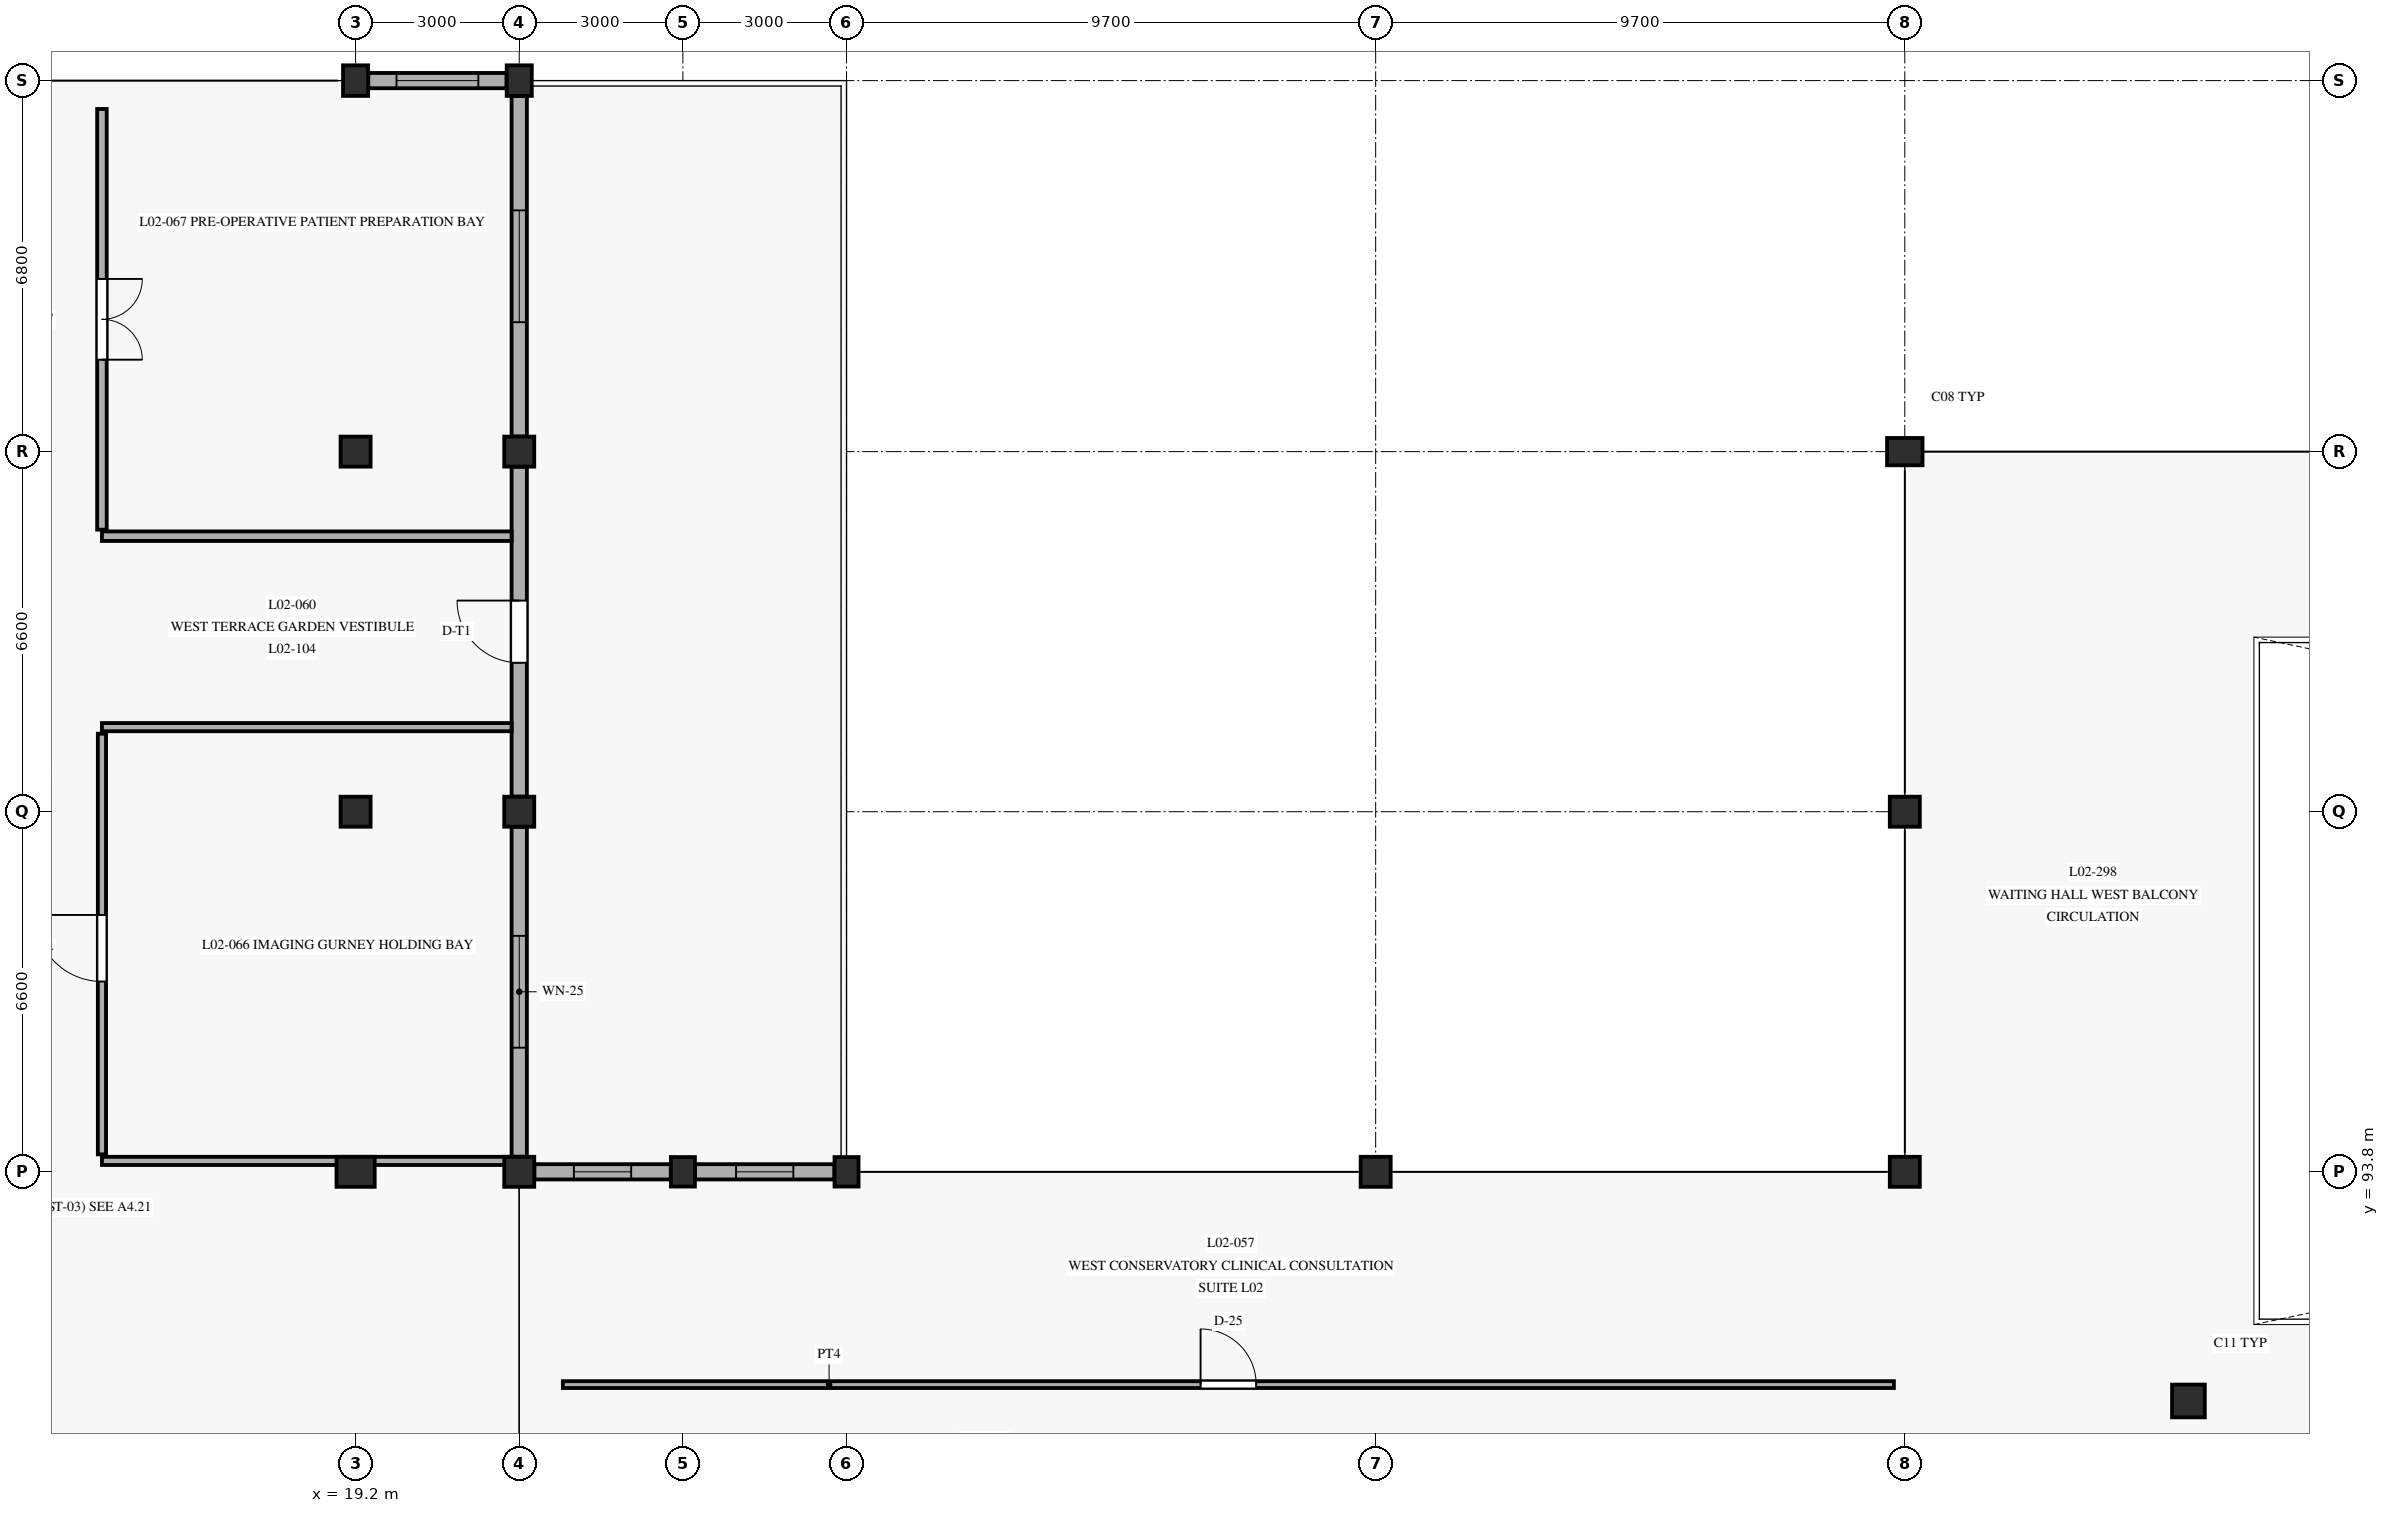
"""IFC4 building model, lengths in metres.
Left out: names, types, materials, properties, quantities, classifications, styles, units other than length and angle.
Written with IfcOpenShell. Run it as: python <this file> out.ifc"""

import sys

from ifc_helpers import new_model, si_unit, direction, frame, frame_2d, origin, origin_with_axes, origin_2d, place, context, subcontext, project, spatial, rectangle, circle, extrude, element, fill, save


model = new_model("IFC4")
c1 = context("Model", 3, precision=1e-05, world=origin(), true_north=direction((0.0, 1.0)))
c2 = subcontext(c1, "Body", "Model", "MODEL_VIEW")
j1 = project(units=[si_unit("LENGTHUNIT", "METRE"), si_unit("PLANEANGLEUNIT", "RADIAN")], contexts=[c1])
p1 = place(None, origin())
s1 = spatial("IfcSite", under=j1, at=p1, CompositionType="ELEMENT")
p2 = place(p1, origin())
s2 = spatial("IfcBuilding", under=s1, at=p2, CompositionType="ELEMENT")
p3 = place(p2, frame((0.0, 0.0, 4.8)))
s3 = spatial("IfcBuildingStorey", under=s2, at=p3, CompositionType="ELEMENT", Elevation=4.8)
p4 = place(p3, frame((19.2, 93.8, 0.0), z_axis=(0.0, 0.0, 1.0), x_axis=(1.0, 0.0, 0.0)))
e1 = element("IfcColumn", 1, at=p4, inside=s3, PredefinedType="COLUMN", context=c2, shape_type="SweptSolid", body=[
    extrude(rectangle(XDim=0.7, YDim=0.55, at=origin_2d()), origin(), (0.0, 0.0, 1.0), 4.5),
])
for number, where, z_axis, x_axis in (
    (2, (19.2, 100.4, 0.0), (0.0, 0.0, 1.0), (1.0, 0.0, 0.0)),
    (3, (19.2, 107.0, 0.0), (0.0, 0.0, 1.0), (1.0, 0.0, 0.0)),
):
    element("IfcColumn", number, at=place(p3, frame(where, z_axis=z_axis, x_axis=x_axis)), inside=s3, PredefinedType="COLUMN", context=c2, shape_type="SweptSolid", body=[
        extrude(rectangle(XDim=0.55, YDim=0.55, at=origin_2d()), origin(), (0.0, 0.0, 1.0), 4.5),
    ])
p5 = place(p3, frame((19.2, 113.8, 0.0), z_axis=(0.0, 0.0, 1.0), x_axis=(1.0, 0.0, 0.0)))
e4 = element("IfcColumn", 4, at=p5, inside=s3, PredefinedType="COLUMN", context=c2, shape_type="SweptSolid", body=[
    extrude(rectangle(XDim=0.46, YDim=0.56, at=origin_2d()), origin(), (0.0, 0.0, 1.0), 4.5),
])
for number, where, z_axis, x_axis in (
    (5, (22.2, 93.8, 0.0), (0.0, 0.0, 1.0), (1.0, 0.0, 0.0)),
    (6, (22.2, 100.4, 0.0), (0.0, 0.0, 1.0), (1.0, 0.0, 0.0)),
    (7, (22.2, 107.0, 0.0), (0.0, 0.0, 1.0), (1.0, 0.0, 0.0)),
):
    element("IfcColumn", number, at=place(p3, frame(where, z_axis=z_axis, x_axis=x_axis)), inside=s3, PredefinedType="COLUMN", context=c2, shape_type="SweptSolid", body=[
        extrude(rectangle(XDim=0.55, YDim=0.55, at=origin_2d()), origin(), (0.0, 0.0, 1.0), 4.5),
    ])
p6 = place(p3, frame((22.2, 113.8, 0.0), z_axis=(0.0, 0.0, 1.0), x_axis=(1.0, 0.0, 0.0)))
e8 = element("IfcColumn", 8, at=p6, inside=s3, PredefinedType="COLUMN", context=c2, shape_type="SweptSolid", body=[
    extrude(rectangle(XDim=0.46, YDim=0.56, at=origin_2d()), origin(), (0.0, 0.0, 1.0), 4.5),
])
for number, where, z_axis, x_axis in (
    (9, (25.2, 93.8, 0.0), (0.0, 0.0, 1.0), (1.0, 0.0, 0.0)),
    (10, (28.2, 93.8, 0.0), (0.0, 0.0, 1.0), (1.0, 0.0, 0.0)),
):
    element("IfcColumn", number, at=place(p3, frame(where, z_axis=z_axis, x_axis=x_axis)), inside=s3, PredefinedType="PILASTER", context=c2, shape_type="SweptSolid", body=[
        extrude(rectangle(XDim=0.44, YDim=0.54, at=origin_2d()), origin(), (0.0, 0.0, 1.0), 4.5),
    ])
for number, where, z_axis, x_axis in (
    (11, (37.9, 93.8, 0.0), (0.0, 0.0, 1.0), (1.0, 0.0, 0.0)),
    (12, (47.6, 93.8, 0.0), (0.0, 0.0, 1.0), (1.0, 0.0, 0.0)),
    (13, (47.6, 100.4, 0.0), (0.0, 0.0, 1.0), (1.0, 0.0, 0.0)),
):
    element("IfcColumn", number, at=place(p3, frame(where, z_axis=z_axis, x_axis=x_axis)), inside=s3, PredefinedType="COLUMN", context=c2, shape_type="SweptSolid", body=[
        extrude(rectangle(XDim=0.55, YDim=0.55, at=origin_2d()), origin(), (0.0, 0.0, 1.0), 4.5),
    ])
p7 = place(p3, frame((47.6, 107.0, 0.0), z_axis=(0.0, 0.0, 1.0), x_axis=(1.0, 0.0, 0.0)))
e14 = element("IfcColumn", 14, at=p7, inside=s3, PredefinedType="COLUMN", context=c2, shape_type="SweptSolid", body=[
    extrude(rectangle(XDim=0.65, YDim=0.5, at=origin_2d()), origin(), (0.0, 0.0, 1.0), 4.5),
])
p8 = place(p3, frame((52.8, 89.6, 0.0), z_axis=(0.0, 0.0, 1.0), x_axis=(1.0, 0.0, 0.0)))
e15 = element("IfcColumn", 15, at=p8, inside=s3, PredefinedType="COLUMN", context=c2, shape_type="SweptSolid", body=[
    extrude(circle(Radius=0.3, at=origin_2d()), origin(), (0.0, 0.0, 1.0), 4.5),
])
p9 = place(p3, frame((22.2, 94.077, 0.0), z_axis=(0.0, 0.0, 1.0), x_axis=(0.0, 1.0, 0.0)))
e16 = element("IfcWall", 16, at=p9, inside=s3, PredefinedType="SOLIDWALL", context=c2, shape_type="SweptSolid", body=[
    extrude(rectangle(XDim=6.046, YDim=0.28, at=frame_2d((3.023, 0.0))), origin(), (0.0, 0.0, 1.0), 3.74),
])
p10 = place(p9, frame((1.998, 0.0, 0.8)))
e17 = element("IfcOpeningElement", 17, at=p10, cuts=e16, PredefinedType="OPENING", context=c2, shape_type="SweptSolid", body=[
    extrude(rectangle(XDim=2.05, YDim=1.95, at=frame_2d((1.025, 0.975))), frame((0.0, 0.15, 0.0), z_axis=(0.0, -1.0, 0.0), x_axis=(1.0, 0.0, 0.0)), (0.0, 0.0, 1.0), 0.3),
])
p11 = place(p3, frame((22.2, 100.677, 0.0), z_axis=(0.0, 0.0, 1.0), x_axis=(0.0, 1.0, 0.0)))
e18 = element("IfcWall", 18, at=p11, inside=s3, PredefinedType="SOLIDWALL", context=c2, shape_type="SweptSolid", body=[
    extrude(rectangle(XDim=6.046, YDim=0.28, at=frame_2d((3.023, 0.0))), origin(), (0.0, 0.0, 1.0), 3.79),
])
p12 = place(p11, frame((2.453, 0.0, 0.0)))
e19 = element("IfcOpeningElement", 19, at=p12, cuts=e18, PredefinedType="OPENING", context=c2, shape_type="SweptSolid", body=[
    extrude(rectangle(XDim=1.14, YDim=2.3, at=frame_2d((0.57, 1.15))), frame((0.0, 0.15, 0.0), z_axis=(0.0, -1.0, 0.0), x_axis=(1.0, 0.0, 0.0)), (0.0, 0.0, 1.0), 0.3),
])
p13 = place(p3, frame((22.2, 107.277, 0.0), z_axis=(0.0, 0.0, 1.0), x_axis=(0.0, 1.0, 0.0)))
e20 = element("IfcWall", 20, at=p13, inside=s3, PredefinedType="SOLIDWALL", context=c2, shape_type="SweptSolid", body=[
    extrude(rectangle(XDim=6.241, YDim=0.28, at=frame_2d((3.121, 0.0))), origin(), (0.0, 0.0, 1.0), 3.79),
])
p14 = place(p13, frame((2.095, 0.0, 0.8)))
e21 = element("IfcOpeningElement", 21, at=p14, cuts=e20, PredefinedType="OPENING", context=c2, shape_type="SweptSolid", body=[
    extrude(rectangle(XDim=2.05, YDim=1.95, at=frame_2d((1.025, 0.975))), frame((0.0, 0.15, 0.0), z_axis=(0.0, -1.0, 0.0), x_axis=(1.0, 0.0, 0.0)), (0.0, 0.0, 1.0), 0.3),
])
p15 = place(p3, frame((21.968, 113.8, 0.0), z_axis=(0.0, 0.0, 1.0), x_axis=(-1.0, 0.0, 0.0)))
e22 = element("IfcWall", 22, at=p15, inside=s3, PredefinedType="SOLIDWALL", context=c2, shape_type="SweptSolid", body=[
    extrude(rectangle(XDim=2.536, YDim=0.28, at=frame_2d((1.268, 0.0))), origin(), (0.0, 0.0, 1.0), 3.75),
])
p16 = place(p15, frame((0.518, 0.0, 0.9)))
e23 = element("IfcOpeningElement", 23, at=p16, cuts=e22, PredefinedType="OPENING", context=c2, shape_type="SweptSolid", body=[
    extrude(rectangle(XDim=1.5, YDim=2.2, at=frame_2d((0.75, 1.1))), frame((0.0, 0.15, 0.0), z_axis=(0.0, -1.0, 0.0), x_axis=(1.0, 0.0, 0.0)), (0.0, 0.0, 1.0), 0.3),
])
p17 = place(p3, frame((24.978, 93.8, 0.0), z_axis=(0.0, 0.0, 1.0), x_axis=(-1.0, 0.0, 0.0)))
e24 = element("IfcWall", 24, at=p17, inside=s3, PredefinedType="SOLIDWALL", context=c2, shape_type="SweptSolid", body=[
    extrude(rectangle(XDim=2.501, YDim=0.28, at=frame_2d((1.25, 0.0))), origin(), (0.0, 0.0, 1.0), 3.84),
])
p18 = place(p17, frame((0.726, 0.0, 0.85)))
e25 = element("IfcOpeningElement", 25, at=p18, cuts=e24, PredefinedType="OPENING", context=c2, shape_type="SweptSolid", body=[
    extrude(rectangle(XDim=1.05, YDim=2.2, at=frame_2d((0.525, 1.1))), frame((0.0, 0.15, 0.0), z_axis=(0.0, -1.0, 0.0), x_axis=(1.0, 0.0, 0.0)), (0.0, 0.0, 1.0), 0.3),
])
p19 = place(p3, frame((27.978, 93.8, 0.0), z_axis=(0.0, 0.0, 1.0), x_axis=(-1.0, 0.0, 0.0)))
e26 = element("IfcWall", 26, at=p19, inside=s3, PredefinedType="SOLIDWALL", context=c2, shape_type="SweptSolid", body=[
    extrude(rectangle(XDim=2.556, YDim=0.28, at=frame_2d((1.278, 0.0))), origin(), (0.0, 0.0, 1.0), 3.89),
])
p20 = place(p19, frame((0.753, 0.0, 0.85)))
e27 = element("IfcOpeningElement", 27, at=p20, cuts=e26, PredefinedType="OPENING", context=c2, shape_type="SweptSolid", body=[
    extrude(rectangle(XDim=1.05, YDim=2.2, at=frame_2d((0.525, 1.1))), frame((0.0, 0.15, 0.0), z_axis=(0.0, -1.0, 0.0), x_axis=(1.0, 0.0, 0.0)), (0.0, 0.0, 1.0), 0.3),
])
p21 = place(p3, frame((23.0, 89.9, 0.0), z_axis=(0.0, 0.0, 1.0), x_axis=(1.0, 0.0, 0.0)))
e28 = element("IfcWall", 28, at=p21, inside=s3, PredefinedType="PARTITIONING", context=c2, shape_type="SweptSolid", body=[
    extrude(rectangle(XDim=24.4, YDim=0.125, at=frame_2d((12.2, 0.0))), origin(), (0.0, 0.0, 1.0), 3.785),
])
p22 = place(p21, frame((11.69, 0.0, 0.0)))
e29 = element("IfcOpeningElement", 29, at=p22, cuts=e28, PredefinedType="OPENING", context=c2, shape_type="SweptSolid", body=[
    extrude(rectangle(XDim=1.02, YDim=2.18, at=frame_2d((0.51, 1.09))), frame((0.0, 0.073, 0.0), z_axis=(0.0, -1.0, 0.0), x_axis=(1.0, 0.0, 0.0)), (0.0, 0.0, 1.0), 0.145),
])
p23 = place(p3, frame((14.55, 94.12, 0.0), z_axis=(0.0, 0.0, 1.0), x_axis=(0.0, 1.0, 0.0)))
e30 = element("IfcWall", 30, at=p23, inside=s3, PredefinedType="PARTITIONING", context=c2, shape_type="SweptSolid", body=[
    extrude(rectangle(XDim=7.71, YDim=0.15, at=frame_2d((3.855, 0.0))), origin(), (0.0, 0.0, 1.0), 3.795),
])
p24 = place(p23, frame((3.168, 0.0, 0.0)))
e31 = element("IfcOpeningElement", 31, at=p24, cuts=e30, PredefinedType="OPENING", context=c2, shape_type="SweptSolid", body=[
    extrude(rectangle(XDim=1.22, YDim=2.2, at=frame_2d((0.61, 1.1))), frame((0.0, 0.085, 0.0), z_axis=(0.0, -1.0, 0.0), x_axis=(1.0, 0.0, 0.0)), (0.0, 0.0, 1.0), 0.17),
])
p25 = place(p3, frame((14.55, 94.0, 0.0), z_axis=(0.0, 0.0, 1.0), x_axis=(1.0, 0.0, 0.0)))
e32 = element("IfcWall", 32, at=p25, inside=s3, PredefinedType="PARTITIONING", context=c2, shape_type="SweptSolid", body=[
    extrude(rectangle(XDim=7.51, YDim=0.15, at=frame_2d((3.755, 0.0))), origin(), (0.0, 0.0, 1.0), 3.735),
])
p26 = place(p3, frame((14.55, 101.95, 0.0), z_axis=(0.0, 0.0, 1.0), x_axis=(1.0, 0.0, 0.0)))
e33 = element("IfcWall", 33, at=p26, inside=s3, PredefinedType="PARTITIONING", context=c2, shape_type="SweptSolid", body=[
    extrude(rectangle(XDim=7.51, YDim=0.15, at=frame_2d((3.755, 0.0))), origin(), (0.0, 0.0, 1.0), 3.785),
])
p27 = place(p3, frame((14.55, 105.57, 0.0), z_axis=(0.0, 0.0, 1.0), x_axis=(0.0, 1.0, 0.0)))
e34 = element("IfcWall", 34, at=p27, inside=s3, PredefinedType="PARTITIONING", context=c2, shape_type="SweptSolid", body=[
    extrude(rectangle(XDim=7.71, YDim=0.175, at=frame_2d((3.855, 0.0))), origin(), (0.0, 0.0, 1.0), 3.795),
])
p28 = place(p27, frame((3.115, 0.0, 0.0)))
e35 = element("IfcOpeningElement", 35, at=p28, cuts=e34, PredefinedType="OPENING", context=c2, shape_type="SweptSolid", body=[
    extrude(rectangle(XDim=1.48, YDim=2.28, at=frame_2d((0.74, 1.14))), frame((0.0, 0.098, 0.0), z_axis=(0.0, -1.0, 0.0), x_axis=(1.0, 0.0, 0.0)), (0.0, 0.0, 1.0), 0.195),
])
p29 = place(p3, frame((14.55, 105.45, 0.0), z_axis=(0.0, 0.0, 1.0), x_axis=(1.0, 0.0, 0.0)))
e36 = element("IfcWall", 36, at=p29, inside=s3, PredefinedType="PARTITIONING", context=c2, shape_type="SweptSolid", body=[
    extrude(rectangle(XDim=7.51, YDim=0.175, at=frame_2d((3.755, 0.0))), origin(), (0.0, 0.0, 1.0), 3.785),
])
p30 = place(p10, origin_with_axes())
e37 = element("IfcWindow", 37, at=p30, inside=s3, PartitioningType="SINGLE_PANEL", PredefinedType="WINDOW", context=c2, shape_type="SweptSolid", body=[
    extrude(rectangle(XDim=2.05, YDim=1.95, at=frame_2d((1.025, 0.975))), frame((0.0, 0.03, 0.0), z_axis=(0.0, -1.0, 0.0), x_axis=(1.0, 0.0, 0.0)), (0.0, 0.0, 1.0), 0.06),
])
fill(e17, e37)
p31 = place(p12, frame((1.14, 0.0, 0.0), z_axis=(0.0, 0.0, 1.0), x_axis=(-1.0, 0.0, 0.0)))
e38 = element("IfcDoor", 38, at=p31, inside=s3, OperationType="SINGLE_SWING_LEFT", PredefinedType="DOOR", context=c2, shape_type="SweptSolid", body=[
    extrude(rectangle(XDim=1.14, YDim=2.3, at=frame_2d((0.57, 1.15))), frame((0.0, 0.025, 0.0), z_axis=(0.0, -1.0, 0.0), x_axis=(1.0, 0.0, 0.0)), (0.0, 0.0, 1.0), 0.05),
])
fill(e19, e38)
p32 = place(p14, origin_with_axes())
e39 = element("IfcWindow", 39, at=p32, inside=s3, PartitioningType="SINGLE_PANEL", PredefinedType="WINDOW", context=c2, shape_type="SweptSolid", body=[
    extrude(rectangle(XDim=2.05, YDim=1.95, at=frame_2d((1.025, 0.975))), frame((0.0, 0.03, 0.0), z_axis=(0.0, -1.0, 0.0), x_axis=(1.0, 0.0, 0.0)), (0.0, 0.0, 1.0), 0.06),
])
fill(e21, e39)
p33 = place(p16, origin_with_axes())
e40 = element("IfcWindow", 40, at=p33, inside=s3, PartitioningType="SINGLE_PANEL", PredefinedType="WINDOW", context=c2, shape_type="SweptSolid", body=[
    extrude(rectangle(XDim=1.5, YDim=2.2, at=frame_2d((0.75, 1.1))), frame((0.0, 0.03, 0.0), z_axis=(0.0, -1.0, 0.0), x_axis=(1.0, 0.0, 0.0)), (0.0, 0.0, 1.0), 0.06),
])
fill(e23, e40)
p34 = place(p18, origin_with_axes())
e41 = element("IfcWindow", 41, at=p34, inside=s3, PartitioningType="SINGLE_PANEL", PredefinedType="WINDOW", context=c2, shape_type="SweptSolid", body=[
    extrude(rectangle(XDim=1.05, YDim=2.2, at=frame_2d((0.525, 1.1))), frame((0.0, 0.03, 0.0), z_axis=(0.0, -1.0, 0.0), x_axis=(1.0, 0.0, 0.0)), (0.0, 0.0, 1.0), 0.06),
])
fill(e25, e41)
p35 = place(p20, origin_with_axes())
e42 = element("IfcWindow", 42, at=p35, inside=s3, PartitioningType="SINGLE_PANEL", PredefinedType="WINDOW", context=c2, shape_type="SweptSolid", body=[
    extrude(rectangle(XDim=1.05, YDim=2.2, at=frame_2d((0.525, 1.1))), frame((0.0, 0.03, 0.0), z_axis=(0.0, -1.0, 0.0), x_axis=(1.0, 0.0, 0.0)), (0.0, 0.0, 1.0), 0.06),
])
fill(e27, e42)
p36 = place(p22, origin_with_axes())
e43 = element("IfcDoor", 43, at=p36, inside=s3, OperationType="SINGLE_SWING_LEFT", PredefinedType="DOOR", context=c2, shape_type="SweptSolid", body=[
    extrude(rectangle(XDim=1.02, YDim=2.18, at=frame_2d((0.51, 1.09))), frame((0.0, 0.025, 0.0), z_axis=(0.0, -1.0, 0.0), x_axis=(1.0, 0.0, 0.0)), (0.0, 0.0, 1.0), 0.05),
])
fill(e29, e43)
p37 = place(p24, frame((1.22, 0.0, 0.0), z_axis=(0.0, 0.0, 1.0), x_axis=(-1.0, 0.0, 0.0)))
e44 = element("IfcDoor", 44, at=p37, inside=s3, OperationType="SINGLE_SWING_LEFT", PredefinedType="DOOR", context=c2, shape_type="SweptSolid", body=[
    extrude(rectangle(XDim=1.22, YDim=2.2, at=frame_2d((0.61, 1.1))), frame((0.0, 0.025, 0.0), z_axis=(0.0, -1.0, 0.0), x_axis=(1.0, 0.0, 0.0)), (0.0, 0.0, 1.0), 0.05),
])
fill(e31, e44)
p38 = place(p28, frame((1.48, 0.0, 0.0), z_axis=(0.0, 0.0, 1.0), x_axis=(-1.0, 0.0, 0.0)))
e45 = element("IfcDoor", 45, at=p38, inside=s3, OperationType="DOUBLE_DOOR_SINGLE_SWING", PredefinedType="DOOR", context=c2, shape_type="SweptSolid", body=[
    extrude(rectangle(XDim=1.48, YDim=2.28, at=frame_2d((0.74, 1.14))), frame((0.0, 0.025, 0.0), z_axis=(0.0, -1.0, 0.0), x_axis=(1.0, 0.0, 0.0)), (0.0, 0.0, 1.0), 0.05),
])
fill(e35, e45)
save(model, sys.argv[1])
